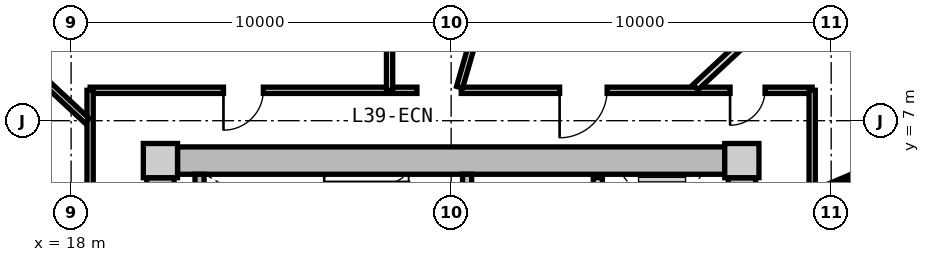
"""IFC4 building model, lengths in metres.
Left out: names, types, materials, properties, quantities, classifications, styles, units other than length and angle.
Written with IfcOpenShell. Run it as: python <this file> out.ifc"""

import sys

from ifc_helpers import new_model, si_unit, direction, frame, frame_2d, origin, origin_2d, place, context, subcontext, project, spatial, rectangle, extrude, source, transform, mapped, element, fill, save


model = new_model("IFC4")
c1 = context("Model", 3, precision=1e-05, world=origin(), true_north=direction((0.0, 1.0)))
c2 = subcontext(c1, "Body", "Model", "MODEL_VIEW")
j1 = project(units=[si_unit("LENGTHUNIT", "METRE"), si_unit("PLANEANGLEUNIT", "RADIAN")], contexts=[c1])
p1 = place(None, origin())
s1 = spatial("IfcSite", under=j1, at=p1, CompositionType="ELEMENT")
p2 = place(p1, origin())
s2 = spatial("IfcBuilding", under=s1, at=p2, CompositionType="ELEMENT")
p3 = place(p2, frame((0.0, 0.0, 126.75)))
s3 = spatial("IfcBuildingStorey", under=s2, at=p3, CompositionType="ELEMENT", Elevation=126.75)
m1 = source(origin(), c2, "Body", "SweptSolid", [
    extrude(rectangle(XDim=0.9, YDim=0.9, at=origin_2d()), origin(), (0.0, 0.0, 1.0), 3.05),
])
for number, where, z_axis, x_axis in (
    (1, (35.65, 5.95, 0.0), (0.0, 0.0, 1.0), (1.0, 0.0, 0.0)),
    (2, (20.35, 5.95, 0.0), (0.0, 0.0, 1.0), (1.0, 0.0, 0.0)),
):
    element("IfcColumn", number, at=place(p3, frame(where, z_axis=z_axis, x_axis=x_axis)), inside=s3, PredefinedType="COLUMN", context=c2, shape_type="MappedRepresentation", body=[
        mapped(m1, transform((0.0, 0.0, 0.0), x_axis=(1.0, 0.0, 0.0), y_axis=(0.0, 1.0, 0.0), z_axis=(0.0, 0.0, 1.0), scale=1.0)),
    ])
m2 = source(origin(), c2, "Body", "SweptSolid", [
    extrude(rectangle(XDim=14.4, YDim=0.72, at=frame_2d((7.2, 0.0))), origin(), (0.0, 0.0, 1.0), 2.73),
])
p4 = place(p3, frame((20.8, 5.95, 0.0), z_axis=(0.0, 0.0, 1.0), x_axis=(1.0, 0.0, 0.0)))
e3 = element("IfcWall", 3, at=p4, inside=s3, PredefinedType="SHEAR", context=c2, shape_type="MappedRepresentation", body=[
    mapped(m2, transform((0.0, 0.0, 0.0), x_axis=(1.0, 0.0, 0.0), y_axis=(0.0, 1.0, 0.0), z_axis=(0.0, 0.0, 1.0), scale=1.0)),
])
m3 = source(origin(), c2, "Body", "SweptSolid", [
    extrude(rectangle(XDim=11.0, YDim=0.72, at=frame_2d((5.5, 0.0))), origin(), (0.0, 0.0, 1.0), 2.73),
])
p5 = place(p3, frame((20.35, -5.5, 0.0), z_axis=(0.0, 0.0, 1.0), x_axis=(0.0, 1.0, 0.0)))
e4 = element("IfcWall", 4, at=p5, inside=s3, PredefinedType="SHEAR", context=c2, shape_type="MappedRepresentation", body=[
    mapped(m3, transform((0.0, 0.0, 0.0), x_axis=(1.0, 0.0, 0.0), y_axis=(0.0, 1.0, 0.0), z_axis=(0.0, 0.0, 1.0), scale=1.0)),
])
p6 = place(p5, frame((3.8, 0.0, 0.0)))
e5 = element("IfcOpeningElement", 5, at=p6, cuts=e4, PredefinedType="OPENING", context=c2, shape_type="SweptSolid", body=[
    extrude(rectangle(XDim=1.2, YDim=2.15, at=frame_2d((0.6, 1.075))), frame((0.0, 0.37, 0.0), z_axis=(0.0, -1.0, 0.0), x_axis=(1.0, 0.0, 0.0)), (0.0, 0.0, 1.0), 0.74),
])
p7 = place(p3, frame((35.65, 5.5, 0.0), z_axis=(0.0, 0.0, 1.0), x_axis=(0.0, -1.0, 0.0)))
e6 = element("IfcWall", 6, at=p7, inside=s3, PredefinedType="SHEAR", context=c2, shape_type="MappedRepresentation", body=[
    mapped(m3, transform((0.0, 0.0, 0.0), x_axis=(1.0, 0.0, 0.0), y_axis=(0.0, 1.0, 0.0), z_axis=(0.0, 0.0, 1.0), scale=1.0)),
])
p8 = place(p7, frame((5.65, 0.0, 0.0)))
e7 = element("IfcOpeningElement", 7, at=p8, cuts=e6, PredefinedType="OPENING", context=c2, shape_type="SweptSolid", body=[
    extrude(rectangle(XDim=1.2, YDim=2.15, at=frame_2d((0.6, 1.075))), frame((0.0, 0.37, 0.0), z_axis=(0.0, -1.0, 0.0), x_axis=(1.0, 0.0, 0.0)), (0.0, 0.0, 1.0), 0.74),
])
m4 = source(origin(), c2, "Body", "SweptSolid", [
    extrude(rectangle(XDim=3.14, YDim=0.24, at=frame_2d((1.57, 0.0))), origin(), (0.0, 0.0, 1.0), 2.73),
])
p9 = place(p3, frame((21.38, 2.45, 0.0), z_axis=(0.0, 0.0, 1.0), x_axis=(0.0, 1.0, 0.0)))
e8 = element("IfcWall", 8, at=p9, inside=s3, PredefinedType="PARTITIONING", context=c2, shape_type="MappedRepresentation", body=[
    mapped(m4, transform((0.0, 0.0, 0.0), x_axis=(1.0, 0.0, 0.0), y_axis=(0.0, 1.0, 0.0), z_axis=(0.0, 0.0, 1.0), scale=1.0)),
])
p10 = place(p3, frame((28.42, 2.45, 0.0), z_axis=(0.0, 0.0, 1.0), x_axis=(0.0, 1.0, 0.0)))
e9 = element("IfcWall", 9, at=p10, inside=s3, PredefinedType="PARTITIONING", context=c2, shape_type="MappedRepresentation", body=[
    mapped(m4, transform((0.0, 0.0, 0.0), x_axis=(1.0, 0.0, 0.0), y_axis=(0.0, 1.0, 0.0), z_axis=(0.0, 0.0, 1.0), scale=1.0)),
])
p11 = place(p10, frame((0.55, 0.0, 0.0)))
e10 = element("IfcOpeningElement", 10, at=p11, cuts=e9, PredefinedType="OPENING", context=c2, shape_type="SweptSolid", body=[
    extrude(rectangle(XDim=1.1, YDim=2.15, at=frame_2d((0.55, 1.075))), frame((0.0, 0.13, 0.0), z_axis=(0.0, -1.0, 0.0), x_axis=(1.0, 0.0, 0.0)), (0.0, 0.0, 1.0), 0.26),
])
m5 = source(origin(), c2, "Body", "SweptSolid", [
    extrude(rectangle(XDim=5.0, YDim=0.24, at=frame_2d((2.5, 0.0))), origin(), (0.0, 0.0, 1.0), 2.715),
])
p12 = place(p3, frame((31.86, 0.5, 0.0), z_axis=(0.0, 0.0, 1.0), x_axis=(0.0, 1.0, 0.0)))
e11 = element("IfcWall", 11, at=p12, inside=s3, PredefinedType="PARTITIONING", context=c2, shape_type="MappedRepresentation", body=[
    mapped(m5, transform((0.0, 0.0, 0.0), x_axis=(1.0, 0.0, 0.0), y_axis=(0.0, 1.0, 0.0), z_axis=(0.0, 0.0, 1.0), scale=1.0)),
])
p13 = place(p12, frame((3.05, 0.0, 0.0)))
e12 = element("IfcOpeningElement", 12, at=p13, cuts=e11, PredefinedType="OPENING", context=c2, shape_type="SweptSolid", body=[
    extrude(rectangle(XDim=1.3, YDim=2.2, at=frame_2d((0.65, 1.1))), frame((0.0, 0.13, 0.0), z_axis=(0.0, -1.0, 0.0), x_axis=(1.0, 0.0, 0.0)), (0.0, 0.0, 1.0), 0.26),
])
p14 = place(p12, frame((0.55, 0.0, 0.0)))
e13 = element("IfcOpeningElement", 13, at=p14, cuts=e11, PredefinedType="OPENING", context=c2, shape_type="SweptSolid", body=[
    extrude(rectangle(XDim=1.3, YDim=2.2, at=frame_2d((0.65, 1.1))), frame((0.0, 0.13, 0.0), z_axis=(0.0, -1.0, 0.0), x_axis=(1.0, 0.0, 0.0)), (0.0, 0.0, 1.0), 0.26),
])
m6 = source(origin(), c2, "Body", "SweptSolid", [
    extrude(rectangle(XDim=8.6, YDim=0.165, at=frame_2d((4.3, 0.0))), origin(), (0.0, 0.0, 1.0), 2.715),
])
p15 = place(p3, frame((18.5, 7.8, 0.0), z_axis=(0.0, 0.0, 1.0), x_axis=(1.0, 0.0, 0.0)))
e14 = element("IfcWall", 14, at=p15, inside=s3, PredefinedType="PARTITIONING", context=c2, shape_type="MappedRepresentation", body=[
    mapped(m6, transform((0.0, 0.0, 0.0), x_axis=(1.0, 0.0, 0.0), y_axis=(0.0, 1.0, 0.0), z_axis=(0.0, 0.0, 1.0), scale=1.0)),
])
p16 = place(p15, frame((3.509, 0.0, 0.0)))
e15 = element("IfcOpeningElement", 15, at=p16, cuts=e14, PredefinedType="OPENING", context=c2, shape_type="SweptSolid", body=[
    extrude(rectangle(XDim=1.05, YDim=2.15, at=frame_2d((0.525, 1.075))), frame((0.0, 0.093, 0.0), z_axis=(0.0, -1.0, 0.0), x_axis=(1.0, 0.0, 0.0)), (0.0, 0.0, 1.0), 0.185),
])
m7 = source(origin(), c2, "Body", "SweptSolid", [
    extrude(rectangle(XDim=9.234, YDim=0.165, at=frame_2d((4.617, 0.0))), origin(), (0.0, 0.0, 1.0), 2.715),
])
p17 = place(p3, frame((28.266, 7.8, 0.0), z_axis=(0.0, 0.0, 1.0), x_axis=(1.0, 0.0, 0.0)))
e16 = element("IfcWall", 16, at=p17, inside=s3, PredefinedType="PARTITIONING", context=c2, shape_type="MappedRepresentation", body=[
    mapped(m7, transform((0.0, 0.0, 0.0), x_axis=(1.0, 0.0, 0.0), y_axis=(0.0, 1.0, 0.0), z_axis=(0.0, 0.0, 1.0), scale=1.0)),
])
p18 = place(p17, frame((7.074, 0.0, 0.0)))
e17 = element("IfcOpeningElement", 17, at=p18, cuts=e16, PredefinedType="OPENING", context=c2, shape_type="SweptSolid", body=[
    extrude(rectangle(XDim=0.92, YDim=2.1, at=frame_2d((0.46, 1.05))), frame((0.0, 0.093, 0.0), z_axis=(0.0, -1.0, 0.0), x_axis=(1.0, 0.0, 0.0)), (0.0, 0.0, 1.0), 0.185),
])
p19 = place(p17, frame((2.588, 0.0, 0.0)))
e18 = element("IfcOpeningElement", 18, at=p19, cuts=e16, PredefinedType="OPENING", context=c2, shape_type="SweptSolid", body=[
    extrude(rectangle(XDim=1.25, YDim=2.2, at=frame_2d((0.625, 1.1))), frame((0.0, 0.093, 0.0), z_axis=(0.0, -1.0, 0.0), x_axis=(1.0, 0.0, 0.0)), (0.0, 0.0, 1.0), 0.185),
])
m8 = source(origin(), c2, "Body", "SweptSolid", [
    extrude(rectangle(XDim=15.6, YDim=0.165, at=frame_2d((7.8, 0.0))), origin(), (0.0, 0.0, 1.0), 2.715),
])
p20 = place(p3, frame((18.5, -7.8, 0.0), z_axis=(0.0, 0.0, 1.0), x_axis=(0.0, 1.0, 0.0)))
e19 = element("IfcWall", 19, at=p20, inside=s3, PredefinedType="PARTITIONING", context=c2, shape_type="MappedRepresentation", body=[
    mapped(m8, transform((0.0, 0.0, 0.0), x_axis=(1.0, 0.0, 0.0), y_axis=(0.0, 1.0, 0.0), z_axis=(0.0, 0.0, 1.0), scale=1.0)),
])
p21 = place(p20, frame((10.383, 0.0, 0.0)))
e20 = element("IfcOpeningElement", 20, at=p21, cuts=e19, PredefinedType="OPENING", context=c2, shape_type="SweptSolid", body=[
    extrude(rectangle(XDim=1.05, YDim=2.15, at=frame_2d((0.525, 1.075))), frame((0.0, 0.093, 0.0), z_axis=(0.0, -1.0, 0.0), x_axis=(1.0, 0.0, 0.0)), (0.0, 0.0, 1.0), 0.185),
])
p22 = place(p20, frame((6.419, 0.0, 0.0)))
e21 = element("IfcOpeningElement", 21, at=p22, cuts=e19, PredefinedType="OPENING", context=c2, shape_type="SweptSolid", body=[
    extrude(rectangle(XDim=1.05, YDim=2.15, at=frame_2d((0.525, 1.075))), frame((0.0, 0.093, 0.0), z_axis=(0.0, -1.0, 0.0), x_axis=(1.0, 0.0, 0.0)), (0.0, 0.0, 1.0), 0.185),
])
p23 = place(p3, frame((37.5, 7.8, 0.0), z_axis=(0.0, 0.0, 1.0), x_axis=(0.0, -1.0, 0.0)))
e22 = element("IfcWall", 22, at=p23, inside=s3, PredefinedType="PARTITIONING", context=c2, shape_type="MappedRepresentation", body=[
    mapped(m8, transform((0.0, 0.0, 0.0), x_axis=(1.0, 0.0, 0.0), y_axis=(0.0, 1.0, 0.0), z_axis=(0.0, 0.0, 1.0), scale=1.0)),
])
p24 = place(p23, frame((12.094, 0.0, 0.0)))
e23 = element("IfcOpeningElement", 23, at=p24, cuts=e22, PredefinedType="OPENING", context=c2, shape_type="SweptSolid", body=[
    extrude(rectangle(XDim=1.05, YDim=2.15, at=frame_2d((0.525, 1.075))), frame((0.0, 0.093, 0.0), z_axis=(0.0, -1.0, 0.0), x_axis=(1.0, 0.0, 0.0)), (0.0, 0.0, 1.0), 0.185),
])
p25 = place(p23, frame((5.971, 0.0, 0.0)))
e24 = element("IfcOpeningElement", 24, at=p25, cuts=e22, PredefinedType="OPENING", context=c2, shape_type="SweptSolid", body=[
    extrude(rectangle(XDim=1.05, YDim=2.15, at=frame_2d((0.525, 1.075))), frame((0.0, 0.093, 0.0), z_axis=(0.0, -1.0, 0.0), x_axis=(1.0, 0.0, 0.0)), (0.0, 0.0, 1.0), 0.185),
])
p26 = place(p23, frame((3.324, 0.0, 0.0)))
e25 = element("IfcOpeningElement", 25, at=p26, cuts=e22, PredefinedType="OPENING", context=c2, shape_type="SweptSolid", body=[
    extrude(rectangle(XDim=0.92, YDim=2.1, at=frame_2d((0.46, 1.05))), frame((0.0, 0.093, 0.0), z_axis=(0.0, -1.0, 0.0), x_axis=(1.0, 0.0, 0.0)), (0.0, 0.0, 1.0), 0.185),
])
m9 = source(origin(), c2, "Body", "SweptSolid", [
    extrude(rectangle(XDim=8.989, YDim=0.165, at=frame_2d((4.495, 0.0))), origin(), (0.0, 0.0, 1.0), 2.215),
])
p27 = place(p3, frame((28.222, 7.88, 0.0), z_axis=(0.0, 0.0, 1.0), x_axis=(0.27702323008, 0.960863221274, 0.0)))
e26 = element("IfcWall", 26, at=p27, inside=s3, PredefinedType="PARTITIONING", context=c2, shape_type="MappedRepresentation", body=[
    mapped(m9, transform((0.0, 0.0, 0.0), x_axis=(1.0, 0.0, 0.0), y_axis=(0.0, 1.0, 0.0), z_axis=(0.0, 0.0, 1.0), scale=1.0)),
])
m10 = source(origin(), c2, "Body", "SweptSolid", [
    extrude(rectangle(XDim=7.482, YDim=0.165, at=frame_2d((3.741, 0.0))), origin(), (0.0, 0.0, 1.0), 2.215),
])
p28 = place(p3, frame((18.42, 6.998, 0.0), z_axis=(0.0, 0.0, 1.0), x_axis=(-0.732508698043, 0.680757671489, 0.0)))
e27 = element("IfcWall", 27, at=p28, inside=s3, PredefinedType="PARTITIONING", context=c2, shape_type="MappedRepresentation", body=[
    mapped(m10, transform((0.0, 0.0, 0.0), x_axis=(1.0, 0.0, 0.0), y_axis=(0.0, 1.0, 0.0), z_axis=(0.0, 0.0, 1.0), scale=1.0)),
])
m11 = source(origin(), c2, "Body", "SweptSolid", [
    extrude(rectangle(XDim=6.99, YDim=0.165, at=frame_2d((3.495, 0.0))), origin(), (0.0, 0.0, 1.0), 2.715),
])
p29 = place(p3, frame((26.38, 7.8, 0.0), z_axis=(0.0, 0.0, 1.0), x_axis=(0.0, 1.0, 0.0)))
e28 = element("IfcWall", 28, at=p29, inside=s3, PredefinedType="PARTITIONING", context=c2, shape_type="MappedRepresentation", body=[
    mapped(m11, transform((0.0, 0.0, 0.0), x_axis=(1.0, 0.0, 0.0), y_axis=(0.0, 1.0, 0.0), z_axis=(0.0, 0.0, 1.0), scale=1.0)),
])
m12 = source(origin(), c2, "Body", "SweptSolid", [
    extrude(rectangle(XDim=4.735, YDim=0.14, at=frame_2d((2.368, 0.0))), origin(), (0.0, 0.0, 1.0), 2.715),
])
p30 = place(p3, frame((18.47, 4.368, 0.0), z_axis=(0.0, 0.0, 1.0), x_axis=(-0.863537576642, 0.504284496814, 0.0)))
e29 = element("IfcWall", 29, at=p30, inside=s3, PredefinedType="PARTITIONING", context=c2, shape_type="MappedRepresentation", body=[
    mapped(m12, transform((0.0, 0.0, 0.0), x_axis=(1.0, 0.0, 0.0), y_axis=(0.0, 1.0, 0.0), z_axis=(0.0, 0.0, 1.0), scale=1.0)),
])
p31 = place(p30, frame((1.908, 0.0, 0.0)))
e30 = element("IfcOpeningElement", 30, at=p31, cuts=e29, PredefinedType="OPENING", context=c2, shape_type="SweptSolid", body=[
    extrude(rectangle(XDim=0.92, YDim=2.1, at=frame_2d((0.46, 1.05))), frame((0.0, 0.08, 0.0), z_axis=(0.0, -1.0, 0.0), x_axis=(1.0, 0.0, 0.0)), (0.0, 0.0, 1.0), 0.16),
])
m13 = source(origin(), c2, "Body", "SweptSolid", [
    extrude(rectangle(XDim=6.187, YDim=0.19, at=frame_2d((3.093, 0.0))), origin(), (0.0, 0.0, 1.0), 2.215),
])
p32 = place(p3, frame((34.429, 7.88, 0.0), z_axis=(0.0, 0.0, 1.0), x_axis=(0.732501077882, 0.680765870841, 0.0)))
e31 = element("IfcWall", 31, at=p32, inside=s3, PredefinedType="PARTITIONING", context=c2, shape_type="MappedRepresentation", body=[
    mapped(m13, transform((0.0, 0.0, 0.0), x_axis=(1.0, 0.0, 0.0), y_axis=(0.0, 1.0, 0.0), z_axis=(0.0, 0.0, 1.0), scale=1.0)),
])
m14 = source(origin(), c2, "Body", "SweptSolid", [
    extrude(rectangle(XDim=4.968, YDim=0.14, at=frame_2d((2.484, 0.0))), origin(), (0.0, 0.0, 1.0), 2.715),
])
p33 = place(p3, frame((37.53, 5.092, 0.0), z_axis=(0.0, 0.0, 1.0), x_axis=(0.920595165864, 0.39051829738, 0.0)))
e32 = element("IfcWall", 32, at=p33, inside=s3, PredefinedType="PARTITIONING", context=c2, shape_type="MappedRepresentation", body=[
    mapped(m14, transform((0.0, 0.0, 0.0), x_axis=(1.0, 0.0, 0.0), y_axis=(0.0, 1.0, 0.0), z_axis=(0.0, 0.0, 1.0), scale=1.0)),
])
m15 = source(origin(), c2, "Body", "SweptSolid", [
    extrude(rectangle(XDim=1.05, YDim=2.15, at=frame_2d((0.525, 1.075))), frame((0.0, 0.025, 0.0), z_axis=(0.0, -1.0, 0.0), x_axis=(1.0, 0.0, 0.0)), (0.0, 0.0, 1.0), 0.05),
])
p34 = place(p16, frame((1.05, 0.0, 0.0), z_axis=(0.0, 0.0, 1.0), x_axis=(-1.0, 0.0, 0.0)))
e33 = element("IfcDoor", 33, at=p34, inside=s3, OperationType="SINGLE_SWING_RIGHT", PredefinedType="DOOR", context=c2, shape_type="MappedRepresentation", body=[
    mapped(m15, transform((0.0, 0.0, 0.0), x_axis=(1.0, 0.0, 0.0), y_axis=(0.0, 1.0, 0.0), z_axis=(0.0, 0.0, 1.0), scale=1.0)),
])
fill(e15, e33)
m16 = source(origin(), c2, "Body", "SweptSolid", [
    extrude(rectangle(XDim=0.92, YDim=2.1, at=frame_2d((0.46, 1.05))), frame((0.0, 0.025, 0.0), z_axis=(0.0, -1.0, 0.0), x_axis=(1.0, 0.0, 0.0)), (0.0, 0.0, 1.0), 0.05),
])
p35 = place(p18, frame((0.92, 0.0, 0.0), z_axis=(0.0, 0.0, 1.0), x_axis=(-1.0, 0.0, 0.0)))
e34 = element("IfcDoor", 34, at=p35, inside=s3, OperationType="SINGLE_SWING_RIGHT", PredefinedType="DOOR", context=c2, shape_type="MappedRepresentation", body=[
    mapped(m16, transform((0.0, 0.0, 0.0), x_axis=(1.0, 0.0, 0.0), y_axis=(0.0, 1.0, 0.0), z_axis=(0.0, 0.0, 1.0), scale=1.0)),
])
fill(e17, e34)
m17 = source(origin(), c2, "Body", "SweptSolid", [
    extrude(rectangle(XDim=1.25, YDim=2.2, at=frame_2d((0.625, 1.1))), frame((0.0, 0.025, 0.0), z_axis=(0.0, -1.0, 0.0), x_axis=(1.0, 0.0, 0.0)), (0.0, 0.0, 1.0), 0.05),
])
p36 = place(p19, frame((1.25, 0.0, 0.0), z_axis=(0.0, 0.0, 1.0), x_axis=(-1.0, 0.0, 0.0)))
e35 = element("IfcDoor", 35, at=p36, inside=s3, OperationType="SINGLE_SWING_RIGHT", PredefinedType="DOOR", context=c2, shape_type="MappedRepresentation", body=[
    mapped(m17, transform((0.0, 0.0, 0.0), x_axis=(1.0, 0.0, 0.0), y_axis=(0.0, 1.0, 0.0), z_axis=(0.0, 0.0, 1.0), scale=1.0)),
])
fill(e18, e35)
save(model, sys.argv[1])
